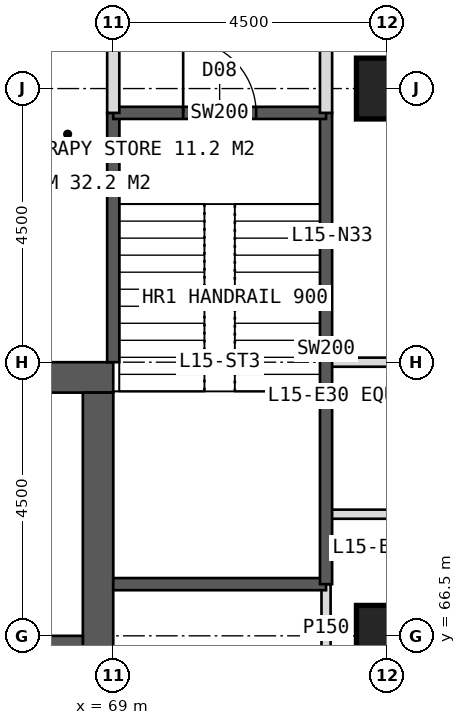
"""IFC4 building model, lengths in metres.
Left out: names, types, materials, properties, quantities, classifications, styles, units other than length and angle.
Written with IfcOpenShell. Run it as: python <this file> out.ifc"""

import sys

from ifc_helpers import new_model, si_unit, direction, frame, frame_2d, origin, origin_2d, place, context, subcontext, project, spatial, rectangle, hollow_rectangle, extrude, element, fill, save


model = new_model("IFC4")
c1 = context("Model", 3, precision=1e-05, world=origin(), true_north=direction((0.0, 1.0)))
c2 = subcontext(c1, "Body", "Model", "MODEL_VIEW")
j1 = project(units=[si_unit("LENGTHUNIT", "METRE"), si_unit("PLANEANGLEUNIT", "RADIAN")], contexts=[c1])
p1 = place(None, origin())
s1 = spatial("IfcSite", under=j1, at=p1, CompositionType="ELEMENT")
p2 = place(p1, origin())
s2 = spatial("IfcBuilding", under=s1, at=p2, CompositionType="ELEMENT")
p3 = place(p2, frame((0.0, 0.0, 67.0)))
s3 = spatial("IfcBuildingStorey", under=s2, at=p3, CompositionType="ELEMENT", Elevation=67.0)
p4 = place(p3, frame((51.0, 70.75, 0.0), z_axis=(0.0, 0.0, 1.0), x_axis=(1.0, 0.0, 0.0)))
e1 = element("IfcWall", 1, at=p4, inside=s3, PredefinedType="SHEAR", context=c2, shape_type="SweptSolid", body=[
    extrude(rectangle(XDim=18.0, YDim=0.5, at=frame_2d((9.0, 0.0))), origin(), (0.0, 0.0, 1.0), 4.0),
])
p5 = place(p4, frame((8.1, 0.0, 0.0)))
e2 = element("IfcOpeningElement", 2, at=p5, cuts=e1, PredefinedType="OPENING", context=c2, shape_type="SweptSolid", body=[
    extrude(rectangle(XDim=1.8, YDim=2.2, at=frame_2d((0.9, 1.1))), frame((0.0, 0.26, 0.0), z_axis=(0.0, -1.0, 0.0), x_axis=(1.0, 0.0, 0.0)), (0.0, 0.0, 1.0), 0.52),
])
p6 = place(p3, frame((68.75, 53.5, 0.0), z_axis=(0.0, 0.0, 1.0), x_axis=(0.0, 1.0, 0.0)))
e3 = element("IfcWall", 3, at=p6, inside=s3, PredefinedType="SHEAR", context=c2, shape_type="SweptSolid", body=[
    extrude(rectangle(XDim=17.0, YDim=0.5, at=frame_2d((8.5, 0.0))), origin(), (0.0, 0.0, 1.0), 4.0),
])
p7 = place(p6, frame((9.5, 0.0, 0.0)))
e4 = element("IfcOpeningElement", 4, at=p7, cuts=e3, PredefinedType="OPENING", context=c2, shape_type="SweptSolid", body=[
    extrude(rectangle(XDim=1.5, YDim=2.2, at=frame_2d((0.75, 1.1))), frame((0.0, 0.26, 0.0), z_axis=(0.0, -1.0, 0.0), x_axis=(1.0, 0.0, 0.0)), (0.0, 0.0, 1.0), 0.52),
])
p8 = place(p3, frame((65.2, 66.35, 0.0), z_axis=(0.0, 0.0, 1.0), x_axis=(1.0, 0.0, 0.0)))
e5 = element("IfcWall", 5, at=p8, inside=s3, PredefinedType="SHEAR", context=c2, shape_type="SweptSolid", body=[
    extrude(rectangle(XDim=3.3, YDim=0.3, at=frame_2d((1.65, 0.0))), origin(), (0.0, 0.0, 1.0), 4.0),
])
p9 = place(p8, frame((1.05, 0.0, 0.0)))
e6 = element("IfcOpeningElement", 6, at=p9, cuts=e5, PredefinedType="OPENING", context=c2, shape_type="SweptSolid", body=[
    extrude(rectangle(XDim=1.2, YDim=2.2, at=frame_2d((0.6, 1.1))), frame((0.0, 0.16, 0.0), z_axis=(0.0, -1.0, 0.0), x_axis=(1.0, 0.0, 0.0)), (0.0, 0.0, 1.0), 0.32),
])
for number, where, z_axis, x_axis in (
    (7, (73.5, 75.5, 0.0), (0.0, 0.0, 1.0), (1.0, 0.0, 0.0)),
    (8, (73.5, 66.5, 0.0), (0.0, 0.0, 1.0), (1.0, 0.0, 0.0)),
):
    element("IfcColumn", number, at=place(p3, frame(where, z_axis=z_axis, x_axis=x_axis)), inside=s3, PredefinedType="COLUMN", context=c2, shape_type="SweptSolid", body=[
        extrude(hollow_rectangle(XDim=1.0, YDim=1.0, WallThickness=0.1, at=origin_2d()), origin(), (0.0, 0.0, 1.0), 4.0),
    ])
for number, where, z_axis, x_axis in (
    (9, (72.5, 71.0, 0.0), (0.0, 0.0, 1.0), (1.0, 0.0, 0.0)),
    (10, (72.5, 68.5, 0.0), (0.0, 0.0, 1.0), (1.0, 0.0, 0.0)),
):
    element("IfcWall", number, at=place(p3, frame(where, z_axis=z_axis, x_axis=x_axis)), inside=s3, PredefinedType="PARTITIONING", context=c2, shape_type="SweptSolid", body=[
        extrude(rectangle(XDim=4.0, YDim=0.15, at=frame_2d((2.0, 0.0))), origin(), (0.0, 0.0, 1.0), 3.75),
    ])
p10 = place(p3, frame((72.5, 65.9, 0.0), z_axis=(0.0, 0.0, 1.0), x_axis=(0.0, 1.0, 0.0)))
e11 = element("IfcWall", 11, at=p10, inside=s3, PredefinedType="PARTITIONING", context=c2, shape_type="SweptSolid", body=[
    extrude(rectangle(XDim=1.45, YDim=0.15, at=frame_2d((0.725, 0.0))), origin(), (0.0, 0.0, 1.0), 3.75),
])
p11 = place(p3, frame((69.0, 71.0, 0.0), z_axis=(0.0, 0.0, 1.0), x_axis=(0.0, 1.0, 0.0)))
e12 = element("IfcWall", 12, at=p11, inside=s3, PredefinedType="SOLIDWALL", context=c2, shape_type="SweptSolid", body=[
    extrude(rectangle(XDim=4.1, YDim=0.2, at=frame_2d((2.05, 0.0))), origin(), (0.0, 0.0, 1.0), 3.75),
])
p12 = place(p3, frame((69.0, 67.35, 0.0), z_axis=(0.0, 0.0, 1.0), x_axis=(1.0, 0.0, 0.0)))
e13 = element("IfcWall", 13, at=p12, inside=s3, PredefinedType="SOLIDWALL", context=c2, shape_type="SweptSolid", body=[
    extrude(rectangle(XDim=3.5, YDim=0.2, at=frame_2d((1.75, 0.0))), origin(), (0.0, 0.0, 1.0), 3.75),
])
p13 = place(p3, frame((72.5, 67.35, 0.0), z_axis=(0.0, 0.0, 1.0), x_axis=(0.0, 1.0, 0.0)))
e14 = element("IfcWall", 14, at=p13, inside=s3, PredefinedType="SOLIDWALL", context=c2, shape_type="SweptSolid", body=[
    extrude(rectangle(XDim=7.75, YDim=0.2, at=frame_2d((3.875, 0.0))), origin(), (0.0, 0.0, 1.0), 3.75),
])
p14 = place(p3, frame((69.0, 75.1, 0.0), z_axis=(0.0, 0.0, 1.0), x_axis=(1.0, 0.0, 0.0)))
e15 = element("IfcWall", 15, at=p14, inside=s3, PredefinedType="SOLIDWALL", context=c2, shape_type="SweptSolid", body=[
    extrude(rectangle(XDim=3.5, YDim=0.2, at=frame_2d((1.75, 0.0))), origin(), (0.0, 0.0, 1.0), 3.75),
])
p15 = place(p14, frame((1.15, 0.0, 0.0)))
e16 = element("IfcOpeningElement", 16, at=p15, cuts=e15, PredefinedType="OPENING", context=c2, shape_type="SweptSolid", body=[
    extrude(rectangle(XDim=1.2, YDim=2.1, at=frame_2d((0.6, 1.05))), frame((0.0, 0.11, 0.0), z_axis=(0.0, -1.0, 0.0), x_axis=(1.0, 0.0, 0.0)), (0.0, 0.0, 1.0), 0.22),
])
for number, where, z_axis, x_axis in (
    (17, (69.0, 75.1, 0.0), (0.0, 0.0, 1.0), (0.0, 1.0, 0.0)),
    (18, (72.5, 75.1, 0.0), (0.0, 0.0, 1.0), (0.0, 1.0, 0.0)),
):
    element("IfcWall", number, at=place(p3, frame(where, z_axis=z_axis, x_axis=x_axis)), inside=s3, PredefinedType="PARTITIONING", context=c2, shape_type="SweptSolid", body=[
        extrude(rectangle(XDim=3.4, YDim=0.2, at=frame_2d((1.7, 0.0))), origin(), (0.0, 0.0, 1.0), 3.75),
    ])
p16 = place(p15, origin())
e19 = element("IfcDoor", 19, at=p16, inside=s3, OperationType="SINGLE_SWING_LEFT", PredefinedType="DOOR", context=c2, shape_type="SweptSolid", body=[
    extrude(rectangle(XDim=1.2, YDim=2.1, at=frame_2d((0.6, 1.05))), frame((0.0, 0.025, 0.0), z_axis=(0.0, -1.0, 0.0), x_axis=(1.0, 0.0, 0.0)), (0.0, 0.0, 1.0), 0.05),
])
fill(e16, e19)
save(model, sys.argv[1])
